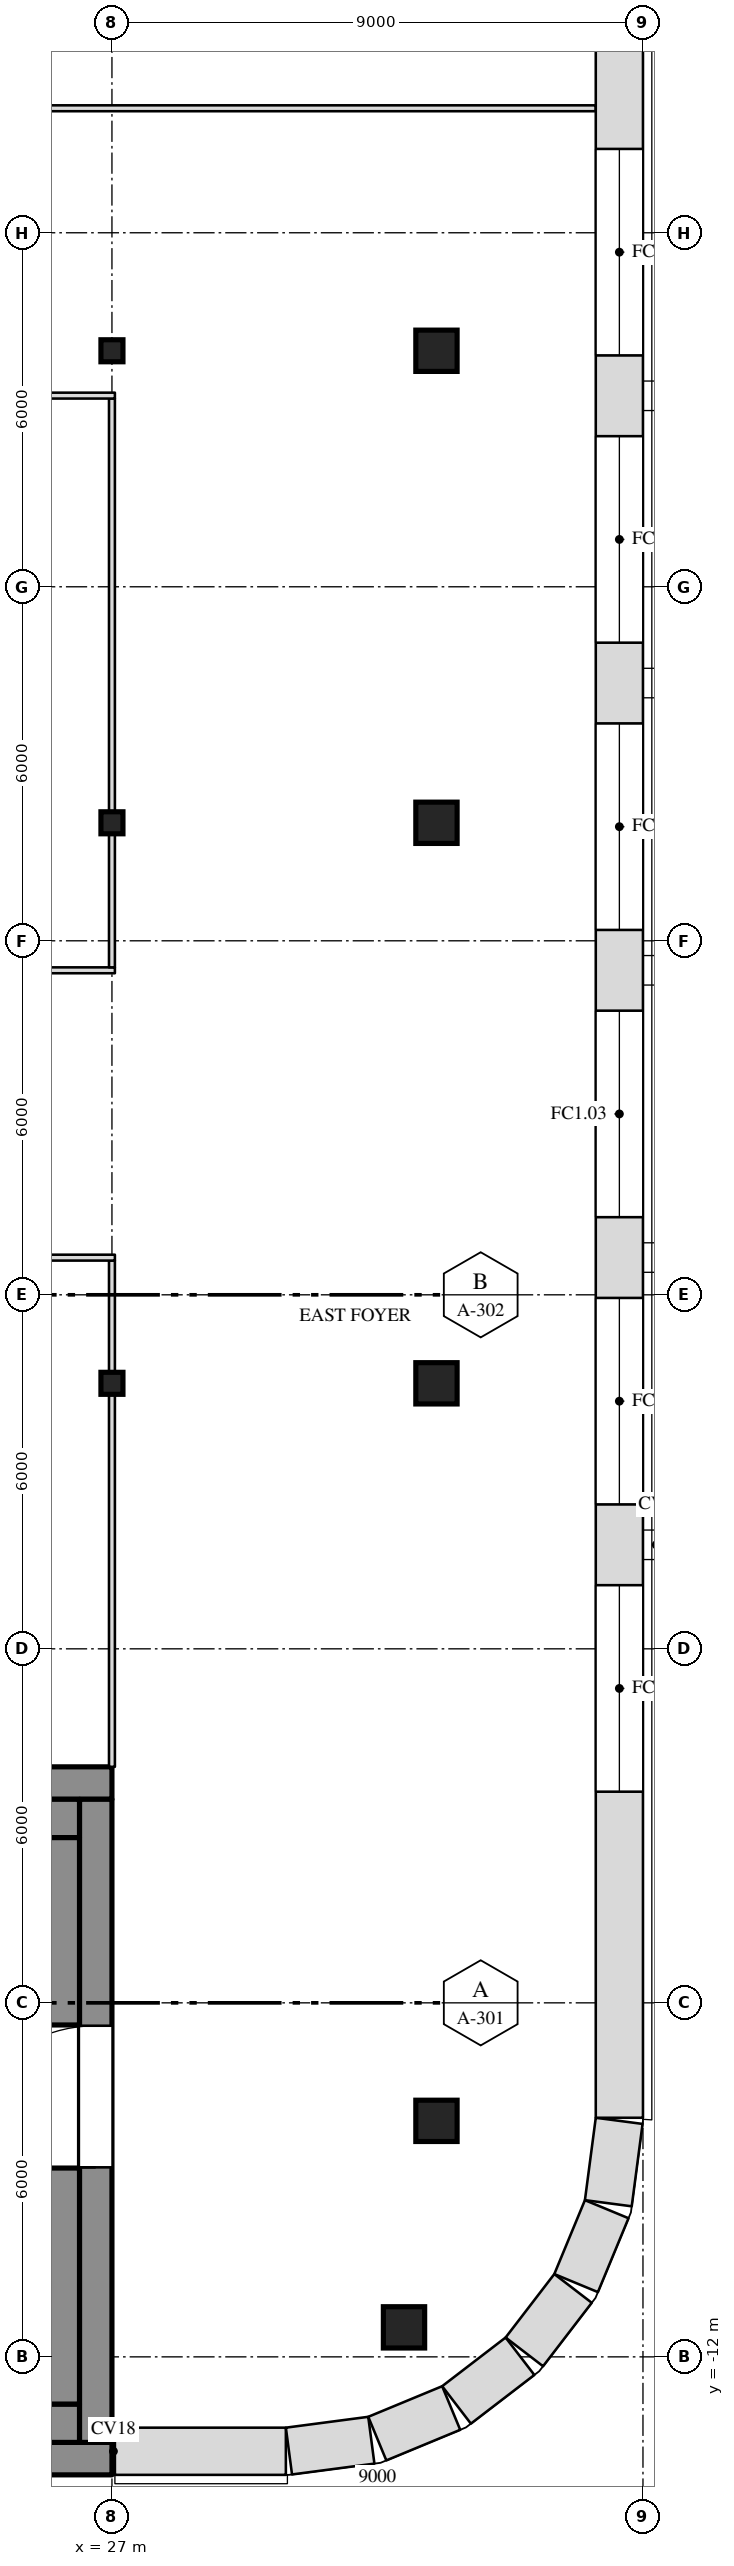
"""IFC4 building model, lengths in metres.
Left out: names, types, materials, properties, quantities, classifications, styles, units other than length and angle.
Written with IfcOpenShell. Run it as: python <this file> out.ifc"""

import sys

from ifc_helpers import new_model, si_unit, direction, frame, frame_2d, origin, origin_2d, place, context, subcontext, project, spatial, rectangle, i_section, extrude, element, fill, save


model = new_model("IFC4")
c1 = context("Model", 3, precision=1e-05, world=origin(), true_north=direction((0.0, 1.0)))
c2 = subcontext(c1, "Body", "Model", "MODEL_VIEW")
j1 = project(units=[si_unit("LENGTHUNIT", "METRE"), si_unit("PLANEANGLEUNIT", "RADIAN")], contexts=[c1])
p1 = place(None, origin())
s1 = spatial("IfcSite", under=j1, at=p1, CompositionType="ELEMENT")
p2 = place(p1, origin())
s2 = spatial("IfcBuilding", under=s1, at=p2, CompositionType="ELEMENT")
p3 = place(p2, frame((0.0, 0.0, 276.5)))
s3 = spatial("IfcBuildingStorey", under=s2, at=p3, CompositionType="ELEMENT", Elevation=276.5)
for number, where, z_axis, x_axis in (
    (1, (31.95, -11.5, 0.0), (0.0, 0.0, 1.0), (1.0, 0.0, 0.0)),
    (2, (32.5, -8.0, 0.0), (0.0, 0.0, 1.0), (1.0, 0.0, 0.0)),
):
    element("IfcColumn", number, at=place(p3, frame(where, z_axis=z_axis, x_axis=x_axis)), inside=s3, PredefinedType="COLUMN", context=c2, shape_type="SweptSolid", body=[
        extrude(rectangle(XDim=0.7, YDim=0.7, at=origin_2d()), origin(), (0.0, 0.0, 1.0), 4.0),
    ])
p4 = place(p3, frame((27.0, 4.5, 0.0), z_axis=(0.0, 0.0, 1.0), x_axis=(1.0, 0.0, 0.0)))
e3 = element("IfcColumn", 3, at=p4, inside=s3, PredefinedType="COLUMN", context=c2, shape_type="SweptSolid", body=[
    extrude(i_section(OverallWidth=0.373, OverallDepth=0.373, WebThickness=0.016, FlangeThickness=0.026, at=origin_2d()), origin(), (0.0, 0.0, 1.0), 4.0),
])
p5 = place(p3, frame((32.5, 4.5, 0.0), z_axis=(0.0, 0.0, 1.0), x_axis=(1.0, 0.0, 0.0)))
e4 = element("IfcColumn", 4, at=p5, inside=s3, PredefinedType="COLUMN", context=c2, shape_type="SweptSolid", body=[
    extrude(rectangle(XDim=0.7, YDim=0.7, at=origin_2d()), origin(), (0.0, 0.0, 1.0), 4.0),
])
p6 = place(p3, frame((27.0, 14.0, 0.0), z_axis=(0.0, 0.0, 1.0), x_axis=(1.0, 0.0, 0.0)))
e5 = element("IfcColumn", 5, at=p6, inside=s3, PredefinedType="COLUMN", context=c2, shape_type="SweptSolid", body=[
    extrude(i_section(OverallWidth=0.373, OverallDepth=0.373, WebThickness=0.016, FlangeThickness=0.026, at=origin_2d()), origin(), (0.0, 0.0, 1.0), 4.0),
])
p7 = place(p3, frame((32.5, 14.0, 0.0), z_axis=(0.0, 0.0, 1.0), x_axis=(1.0, 0.0, 0.0)))
e6 = element("IfcColumn", 6, at=p7, inside=s3, PredefinedType="COLUMN", context=c2, shape_type="SweptSolid", body=[
    extrude(rectangle(XDim=0.7, YDim=0.7, at=origin_2d()), origin(), (0.0, 0.0, 1.0), 4.0),
])
p8 = place(p3, frame((27.0, 22.0, 0.0), z_axis=(0.0, 0.0, 1.0), x_axis=(1.0, 0.0, 0.0)))
e7 = element("IfcColumn", 7, at=p8, inside=s3, PredefinedType="COLUMN", context=c2, shape_type="SweptSolid", body=[
    extrude(i_section(OverallWidth=0.373, OverallDepth=0.373, WebThickness=0.016, FlangeThickness=0.026, at=origin_2d()), origin(), (0.0, 0.0, 1.0), 4.0),
])
p9 = place(p3, frame((32.5, 22.0, 0.0), z_axis=(0.0, 0.0, 1.0), x_axis=(1.0, 0.0, 0.0)))
e8 = element("IfcColumn", 8, at=p9, inside=s3, PredefinedType="COLUMN", context=c2, shape_type="SweptSolid", body=[
    extrude(rectangle(XDim=0.7, YDim=0.7, at=origin_2d()), origin(), (0.0, 0.0, 1.0), 4.0),
])
p10 = place(p3, frame((-27.0, -2.275, 0.0), z_axis=(0.0, 0.0, 1.0), x_axis=(1.0, 0.0, 0.0)))
e9 = element("IfcWall", 9, at=p10, inside=s3, PredefinedType="SHEAR", context=c2, shape_type="SweptSolid", body=[
    extrude(rectangle(XDim=54.0, YDim=0.55, at=frame_2d((27.0, 0.0))), origin(), (0.0, 0.0, 1.0), 3.78),
])
p11 = place(p10, frame((15.15, 0.0, 0.0)))
e10 = element("IfcOpeningElement", 10, at=p11, cuts=e9, PredefinedType="OPENING", context=c2, shape_type="SweptSolid", body=[
    extrude(rectangle(XDim=2.4, YDim=2.1, at=frame_2d((1.2, 1.05))), frame((0.0, 0.287, 0.0), z_axis=(0.0, -1.0, 0.0), x_axis=(1.0, 0.0, 0.0)), (0.0, 0.0, 1.0), 0.574),
])
p12 = place(p10, frame((36.45, 0.0, 0.0)))
e11 = element("IfcOpeningElement", 11, at=p12, cuts=e9, PredefinedType="OPENING", context=c2, shape_type="SweptSolid", body=[
    extrude(rectangle(XDim=2.4, YDim=2.1, at=frame_2d((1.2, 1.05))), frame((0.0, 0.287, 0.0), z_axis=(0.0, -1.0, 0.0), x_axis=(1.0, 0.0, 0.0)), (0.0, 0.0, 1.0), 0.574),
])
p13 = place(p3, frame((-27.0, -13.725, 0.0), z_axis=(0.0, 0.0, 1.0), x_axis=(1.0, 0.0, 0.0)))
e12 = element("IfcWall", 12, at=p13, inside=s3, PredefinedType="SHEAR", context=c2, shape_type="SweptSolid", body=[
    extrude(rectangle(XDim=54.0, YDim=0.55, at=frame_2d((27.0, 0.0))), origin(), (0.0, 0.0, 1.0), 3.78),
])
p14 = place(p3, frame((26.725, -13.45, 0.0), z_axis=(0.0, 0.0, 1.0), x_axis=(0.0, 1.0, 0.0)))
e13 = element("IfcWall", 13, at=p14, inside=s3, PredefinedType="SHEAR", context=c2, shape_type="SweptSolid", body=[
    extrude(rectangle(XDim=10.9, YDim=0.55, at=frame_2d((5.45, 0.0))), origin(), (0.0, 0.0, 1.0), 3.78),
])
p15 = place(p14, frame((4.662, 0.0, 0.0)))
e14 = element("IfcOpeningElement", 14, at=p15, cuts=e13, PredefinedType="OPENING", context=c2, shape_type="SweptSolid", body=[
    extrude(rectangle(XDim=2.4, YDim=2.1, at=frame_2d((1.2, 1.05))), frame((0.0, 0.287, 0.0), z_axis=(0.0, -1.0, 0.0), x_axis=(1.0, 0.0, 0.0)), (0.0, 0.0, 1.0), 0.574),
])
p16 = place(p3, frame((12.0, -2.875, 0.0), z_axis=(0.0, 0.0, 1.0), x_axis=(1.0, 0.0, 0.0)))
e15 = element("IfcWall", 15, at=p16, inside=s3, PredefinedType="SHEAR", context=c2, shape_type="SweptSolid", body=[
    extrude(rectangle(XDim=14.45, YDim=0.65, at=frame_2d((7.225, 0.0))), origin(), (0.0, 0.0, 1.0), 3.78),
])
p17 = place(p3, frame((-26.45, -13.125, 0.0), z_axis=(0.0, 0.0, 1.0), x_axis=(1.0, 0.0, 0.0)))
e16 = element("IfcWall", 16, at=p17, inside=s3, PredefinedType="SHEAR", context=c2, shape_type="SweptSolid", body=[
    extrude(rectangle(XDim=52.9, YDim=0.65, at=frame_2d((26.45, 0.0))), origin(), (0.0, 0.0, 1.0), 3.78),
])
p18 = place(p3, frame((26.125, -12.8, 0.0), z_axis=(0.0, 0.0, 1.0), x_axis=(0.0, 1.0, 0.0)))
e17 = element("IfcWall", 17, at=p18, inside=s3, PredefinedType="SHEAR", context=c2, shape_type="SweptSolid", body=[
    extrude(rectangle(XDim=4.0, YDim=0.65, at=frame_2d((2.0, 0.0))), origin(), (0.0, 0.0, 1.0), 3.78),
])
p19 = place(p3, frame((26.125, -6.375, 0.0), z_axis=(0.0, 0.0, 1.0), x_axis=(0.0, 1.0, 0.0)))
e18 = element("IfcWall", 18, at=p19, inside=s3, PredefinedType="SHEAR", context=c2, shape_type="SweptSolid", body=[
    extrude(rectangle(XDim=3.175, YDim=0.65, at=frame_2d((1.587, 0.0))), origin(), (0.0, 0.0, 1.0), 3.78),
])
p20 = place(p3, frame((27.0, -2.0, 0.0), z_axis=(0.0, 0.0, 1.0), x_axis=(0.0, 1.0, 0.0)))
e19 = element("IfcWall", 19, at=p20, inside=s3, PredefinedType="PARTITIONING", context=c2, shape_type="SweptSolid", body=[
    extrude(rectangle(XDim=6.313, YDim=0.1, at=frame_2d((3.157, 0.0))), origin(), (0.0, 0.0, 1.0), 3.247),
])
p21 = place(p3, frame((27.0, 4.687, 0.0), z_axis=(0.0, 0.0, 1.0), x_axis=(0.0, 1.0, 0.0)))
e20 = element("IfcWall", 20, at=p21, inside=s3, PredefinedType="PARTITIONING", context=c2, shape_type="SweptSolid", body=[
    extrude(rectangle(XDim=1.893, YDim=0.1, at=frame_2d((0.947, 0.0))), origin(), (0.0, 0.0, 1.0), 3.247),
])
p22 = place(p3, frame((13.45, 6.63, 0.0), z_axis=(0.0, 0.0, 1.0), x_axis=(1.0, 0.0, 0.0)))
e21 = element("IfcWall", 21, at=p22, inside=s3, PredefinedType="PARTITIONING", context=c2, shape_type="SweptSolid", body=[
    extrude(rectangle(XDim=13.6, YDim=0.1, at=frame_2d((6.8, 0.0))), origin(), (0.0, 0.0, 1.0), 3.78),
])
p23 = place(p3, frame((-27.05, 11.5, 0.0), z_axis=(0.0, 0.0, 1.0), x_axis=(1.0, 0.0, 0.0)))
e22 = element("IfcWall", 22, at=p23, inside=s3, PredefinedType="PARTITIONING", context=c2, shape_type="SweptSolid", body=[
    extrude(rectangle(XDim=54.1, YDim=0.1, at=frame_2d((27.05, 0.0))), origin(), (0.0, 0.0, 1.0), 3.78),
])
p24 = place(p23, frame((6.35, 0.0, 0.0)))
e23 = element("IfcOpeningElement", 23, at=p24, cuts=e22, PredefinedType="OPENING", context=c2, shape_type="SweptSolid", body=[
    extrude(rectangle(XDim=0.9, YDim=2.1, at=frame_2d((0.45, 1.05))), frame((0.0, 0.062, 0.0), z_axis=(0.0, -1.0, 0.0), x_axis=(1.0, 0.0, 0.0)), (0.0, 0.0, 1.0), 0.124),
])
p25 = place(p23, frame((21.65, 0.0, 0.0)))
e24 = element("IfcOpeningElement", 24, at=p25, cuts=e22, PredefinedType="OPENING", context=c2, shape_type="SweptSolid", body=[
    extrude(rectangle(XDim=1.8, YDim=2.1, at=frame_2d((0.9, 1.05))), frame((0.0, 0.062, 0.0), z_axis=(0.0, -1.0, 0.0), x_axis=(1.0, 0.0, 0.0)), (0.0, 0.0, 1.0), 0.124),
])
p26 = place(p23, frame((35.6, 0.0, 0.0)))
e25 = element("IfcOpeningElement", 25, at=p26, cuts=e22, PredefinedType="OPENING", context=c2, shape_type="SweptSolid", body=[
    extrude(rectangle(XDim=0.9, YDim=2.1, at=frame_2d((0.45, 1.05))), frame((0.0, 0.062, 0.0), z_axis=(0.0, -1.0, 0.0), x_axis=(1.0, 0.0, 0.0)), (0.0, 0.0, 1.0), 0.124),
])
p27 = place(p23, frame((46.4, 0.0, 0.0)))
e26 = element("IfcOpeningElement", 26, at=p27, cuts=e22, PredefinedType="OPENING", context=c2, shape_type="SweptSolid", body=[
    extrude(rectangle(XDim=1.8, YDim=2.1, at=frame_2d((0.9, 1.05))), frame((0.0, 0.062, 0.0), z_axis=(0.0, -1.0, 0.0), x_axis=(1.0, 0.0, 0.0)), (0.0, 0.0, 1.0), 0.124),
])
p28 = place(p3, frame((27.0, 11.55, 0.0), z_axis=(0.0, 0.0, 1.0), x_axis=(0.0, 1.0, 0.0)))
e27 = element("IfcWall", 27, at=p28, inside=s3, PredefinedType="PARTITIONING", context=c2, shape_type="SweptSolid", body=[
    extrude(rectangle(XDim=2.263, YDim=0.1, at=frame_2d((1.132, 0.0))), origin(), (0.0, 0.0, 1.0), 3.247),
])
p29 = place(p3, frame((27.0, 14.187, 0.0), z_axis=(0.0, 0.0, 1.0), x_axis=(0.0, 1.0, 0.0)))
e28 = element("IfcWall", 28, at=p29, inside=s3, PredefinedType="PARTITIONING", context=c2, shape_type="SweptSolid", body=[
    extrude(rectangle(XDim=7.003, YDim=0.1, at=frame_2d((3.501, 0.0))), origin(), (0.0, 0.0, 1.0), 3.247),
])
p30 = place(p3, frame((-27.05, 21.24, 0.0), z_axis=(0.0, 0.0, 1.0), x_axis=(1.0, 0.0, 0.0)))
e29 = element("IfcWall", 29, at=p30, inside=s3, PredefinedType="PARTITIONING", context=c2, shape_type="SweptSolid", body=[
    extrude(rectangle(XDim=54.1, YDim=0.1, at=frame_2d((27.05, 0.0))), origin(), (0.0, 0.0, 1.0), 3.78),
])
p31 = place(p3, frame((-35.2, 26.11, 0.0), z_axis=(0.0, 0.0, 1.0), x_axis=(1.0, 0.0, 0.0)))
e30 = element("IfcWall", 30, at=p31, inside=s3, PredefinedType="PARTITIONING", context=c2, shape_type="SweptSolid", body=[
    extrude(rectangle(XDim=70.4, YDim=0.1, at=frame_2d((35.2, 0.0))), origin(), (0.0, 0.0, 1.0), 3.78),
])
p32 = place(p31, frame((12.25, 0.0, 0.0)))
e31 = element("IfcOpeningElement", 31, at=p32, cuts=e30, PredefinedType="OPENING", context=c2, shape_type="SweptSolid", body=[
    extrude(rectangle(XDim=0.9, YDim=2.1, at=frame_2d((0.45, 1.05))), frame((0.0, 0.062, 0.0), z_axis=(0.0, -1.0, 0.0), x_axis=(1.0, 0.0, 0.0)), (0.0, 0.0, 1.0), 0.124),
])
p33 = place(p31, frame((21.25, 0.0, 0.0)))
e32 = element("IfcOpeningElement", 32, at=p33, cuts=e30, PredefinedType="OPENING", context=c2, shape_type="SweptSolid", body=[
    extrude(rectangle(XDim=0.9, YDim=2.1, at=frame_2d((0.45, 1.05))), frame((0.0, 0.062, 0.0), z_axis=(0.0, -1.0, 0.0), x_axis=(1.0, 0.0, 0.0)), (0.0, 0.0, 1.0), 0.124),
])
p34 = place(p31, frame((36.55, 0.0, 0.0)))
e33 = element("IfcOpeningElement", 33, at=p34, cuts=e30, PredefinedType="OPENING", context=c2, shape_type="SweptSolid", body=[
    extrude(rectangle(XDim=1.8, YDim=2.1, at=frame_2d((0.9, 1.05))), frame((0.0, 0.062, 0.0), z_axis=(0.0, -1.0, 0.0), x_axis=(1.0, 0.0, 0.0)), (0.0, 0.0, 1.0), 0.124),
])
p35 = place(p31, frame((52.75, 0.0, 0.0)))
e34 = element("IfcOpeningElement", 34, at=p35, cuts=e30, PredefinedType="OPENING", context=c2, shape_type="SweptSolid", body=[
    extrude(rectangle(XDim=0.9, YDim=2.1, at=frame_2d((0.45, 1.05))), frame((0.0, 0.062, 0.0), z_axis=(0.0, -1.0, 0.0), x_axis=(1.0, 0.0, 0.0)), (0.0, 0.0, 1.0), 0.124),
])
p36 = place(p31, frame((59.5, 0.0, 0.0)))
e35 = element("IfcOpeningElement", 35, at=p36, cuts=e30, PredefinedType="OPENING", context=c2, shape_type="SweptSolid", body=[
    extrude(rectangle(XDim=0.9, YDim=2.1, at=frame_2d((0.45, 1.05))), frame((0.0, 0.062, 0.0), z_axis=(0.0, -1.0, 0.0), x_axis=(1.0, 0.0, 0.0)), (0.0, 0.0, 1.0), 0.124),
])
p37 = place(p3, frame((27.05, -13.6, 0.0), z_axis=(0.0, 0.0, 1.0), x_axis=(1.0, 0.0, 0.0)))
e36 = element("IfcWall", 36, at=p37, inside=s3, PredefinedType="SOLIDWALL", context=c2, shape_type="SweptSolid", body=[
    extrude(rectangle(XDim=2.897, YDim=0.8, at=frame_2d((1.449, 0.0))), origin(), (0.0, 0.0, 1.0), 3.78),
])
p38 = place(p3, frame((30.0, -13.597, 0.0), z_axis=(0.0, 0.0, 1.0), x_axis=(0.99144603414, 0.130517283865, 0.0)))
e37 = element("IfcWall", 37, at=p38, inside=s3, PredefinedType="SOLIDWALL", context=c2, shape_type="SweptSolid", body=[
    extrude(rectangle(XDim=1.408, YDim=0.8, at=frame_2d((0.704, 0.0))), origin(), (0.0, 0.0, 1.0), 3.78),
])
p39 = place(p3, frame((31.497, -13.386, 0.0), z_axis=(0.0, 0.0, 1.0), x_axis=(0.923847774587, 0.38276009378, 0.0)))
e38 = element("IfcWall", 38, at=p39, inside=s3, PredefinedType="SOLIDWALL", context=c2, shape_type="SweptSolid", body=[
    extrude(rectangle(XDim=1.355, YDim=0.8, at=frame_2d((0.678, 0.0))), origin(), (0.0, 0.0, 1.0), 3.78),
])
for number, where, z_axis, x_axis in (
    (39, (32.84, -12.815, 0.0), (0.0, 0.0, 1.0), (0.793, 0.609, 0.0)),
    (40, (33.989, -11.916, 0.0), (0.0, 0.0, 1.0), (0.609, 0.793, 0.0)),
):
    element("IfcWall", number, at=place(p3, frame(where, z_axis=z_axis, x_axis=x_axis)), inside=s3, PredefinedType="SOLIDWALL", context=c2, shape_type="SweptSolid", body=[
        extrude(rectangle(XDim=1.356, YDim=0.8, at=frame_2d((0.678, 0.0))), origin(), (0.0, 0.0, 1.0), 3.78),
    ])
p40 = place(p3, frame((34.867, -10.75, 0.0), z_axis=(0.0, 0.0, 1.0), x_axis=(0.38276009378, 0.923847774587, 0.0)))
e41 = element("IfcWall", 41, at=p40, inside=s3, PredefinedType="SOLIDWALL", context=c2, shape_type="SweptSolid", body=[
    extrude(rectangle(XDim=1.355, YDim=0.8, at=frame_2d((0.678, 0.0))), origin(), (0.0, 0.0, 1.0), 3.78),
])
p41 = place(p3, frame((35.413, -9.396, 0.0), z_axis=(0.0, 0.0, 1.0), x_axis=(0.130517283865, 0.99144603414, 0.0)))
e42 = element("IfcWall", 42, at=p41, inside=s3, PredefinedType="SOLIDWALL", context=c2, shape_type="SweptSolid", body=[
    extrude(rectangle(XDim=1.408, YDim=0.8, at=frame_2d((0.704, 0.0))), origin(), (0.0, 0.0, 1.0), 3.78),
])
p42 = place(p3, frame((35.6, -7.948, 0.0), z_axis=(0.0, 0.0, 1.0), x_axis=(0.0, 1.0, 0.0)))
e43 = element("IfcWall", 43, at=p42, inside=s3, PredefinedType="SOLIDWALL", context=c2, shape_type="SweptSolid", body=[
    extrude(rectangle(XDim=38.895, YDim=0.8, at=frame_2d((19.448, 0.0))), origin(), (0.0, 0.0, 1.0), 3.78),
])
p43 = place(p42, frame((5.526, 0.0, 1.0)))
e44 = element("IfcOpeningElement", 44, at=p43, cuts=e43, PredefinedType="OPENING", context=c2, shape_type="SweptSolid", body=[
    extrude(rectangle(XDim=3.5, YDim=2.5, at=frame_2d((1.75, 1.25))), frame((0.0, 0.412, 0.0), z_axis=(0.0, -1.0, 0.0), x_axis=(1.0, 0.0, 0.0)), (0.0, 0.0, 1.0), 0.824),
])
p44 = place(p42, frame((10.395, 0.0, 1.0)))
e45 = element("IfcOpeningElement", 45, at=p44, cuts=e43, PredefinedType="OPENING", context=c2, shape_type="SweptSolid", body=[
    extrude(rectangle(XDim=3.5, YDim=2.5, at=frame_2d((1.75, 1.25))), frame((0.0, 0.412, 0.0), z_axis=(0.0, -1.0, 0.0), x_axis=(1.0, 0.0, 0.0)), (0.0, 0.0, 1.0), 0.824),
])
p45 = place(p42, frame((15.263, 0.0, 1.0)))
e46 = element("IfcOpeningElement", 46, at=p45, cuts=e43, PredefinedType="OPENING", context=c2, shape_type="SweptSolid", body=[
    extrude(rectangle(XDim=3.5, YDim=2.5, at=frame_2d((1.75, 1.25))), frame((0.0, 0.412, 0.0), z_axis=(0.0, -1.0, 0.0), x_axis=(1.0, 0.0, 0.0)), (0.0, 0.0, 1.0), 0.824),
])
p46 = place(p42, frame((20.132, 0.0, 1.0)))
e47 = element("IfcOpeningElement", 47, at=p46, cuts=e43, PredefinedType="OPENING", context=c2, shape_type="SweptSolid", body=[
    extrude(rectangle(XDim=3.5, YDim=2.5, at=frame_2d((1.75, 1.25))), frame((0.0, 0.412, 0.0), z_axis=(0.0, -1.0, 0.0), x_axis=(1.0, 0.0, 0.0)), (0.0, 0.0, 1.0), 0.824),
])
p47 = place(p42, frame((25.0, 0.0, 1.0)))
e48 = element("IfcOpeningElement", 48, at=p47, cuts=e43, PredefinedType="OPENING", context=c2, shape_type="SweptSolid", body=[
    extrude(rectangle(XDim=3.5, YDim=2.5, at=frame_2d((1.75, 1.25))), frame((0.0, 0.412, 0.0), z_axis=(0.0, -1.0, 0.0), x_axis=(1.0, 0.0, 0.0)), (0.0, 0.0, 1.0), 0.824),
])
p48 = place(p42, frame((29.869, 0.0, 1.0)))
e49 = element("IfcOpeningElement", 49, at=p48, cuts=e43, PredefinedType="OPENING", context=c2, shape_type="SweptSolid", body=[
    extrude(rectangle(XDim=3.5, YDim=2.5, at=frame_2d((1.75, 1.25))), frame((0.0, 0.412, 0.0), z_axis=(0.0, -1.0, 0.0), x_axis=(1.0, 0.0, 0.0)), (0.0, 0.0, 1.0), 0.824),
])
p49 = place(p43, origin())
e50 = element("IfcWindow", 50, at=p49, inside=s3, PartitioningType="SINGLE_PANEL", PredefinedType="WINDOW", context=c2, shape_type="SweptSolid", body=[
    extrude(rectangle(XDim=3.5, YDim=2.5, at=frame_2d((1.75, 1.25))), frame((0.0, 0.03, 0.0), z_axis=(0.0, -1.0, 0.0), x_axis=(1.0, 0.0, 0.0)), (0.0, 0.0, 1.0), 0.06),
])
fill(e44, e50)
p50 = place(p44, origin())
e51 = element("IfcWindow", 51, at=p50, inside=s3, PartitioningType="SINGLE_PANEL", PredefinedType="WINDOW", context=c2, shape_type="SweptSolid", body=[
    extrude(rectangle(XDim=3.5, YDim=2.5, at=frame_2d((1.75, 1.25))), frame((0.0, 0.03, 0.0), z_axis=(0.0, -1.0, 0.0), x_axis=(1.0, 0.0, 0.0)), (0.0, 0.0, 1.0), 0.06),
])
fill(e45, e51)
p51 = place(p45, origin())
e52 = element("IfcWindow", 52, at=p51, inside=s3, PartitioningType="SINGLE_PANEL", PredefinedType="WINDOW", context=c2, shape_type="SweptSolid", body=[
    extrude(rectangle(XDim=3.5, YDim=2.5, at=frame_2d((1.75, 1.25))), frame((0.0, 0.03, 0.0), z_axis=(0.0, -1.0, 0.0), x_axis=(1.0, 0.0, 0.0)), (0.0, 0.0, 1.0), 0.06),
])
fill(e46, e52)
p52 = place(p46, origin())
e53 = element("IfcWindow", 53, at=p52, inside=s3, PartitioningType="SINGLE_PANEL", PredefinedType="WINDOW", context=c2, shape_type="SweptSolid", body=[
    extrude(rectangle(XDim=3.5, YDim=2.5, at=frame_2d((1.75, 1.25))), frame((0.0, 0.03, 0.0), z_axis=(0.0, -1.0, 0.0), x_axis=(1.0, 0.0, 0.0)), (0.0, 0.0, 1.0), 0.06),
])
fill(e47, e53)
p53 = place(p47, origin())
e54 = element("IfcWindow", 54, at=p53, inside=s3, PartitioningType="SINGLE_PANEL", PredefinedType="WINDOW", context=c2, shape_type="SweptSolid", body=[
    extrude(rectangle(XDim=3.5, YDim=2.5, at=frame_2d((1.75, 1.25))), frame((0.0, 0.03, 0.0), z_axis=(0.0, -1.0, 0.0), x_axis=(1.0, 0.0, 0.0)), (0.0, 0.0, 1.0), 0.06),
])
fill(e48, e54)
p54 = place(p48, origin())
e55 = element("IfcWindow", 55, at=p54, inside=s3, PartitioningType="SINGLE_PANEL", PredefinedType="WINDOW", context=c2, shape_type="SweptSolid", body=[
    extrude(rectangle(XDim=3.5, YDim=2.5, at=frame_2d((1.75, 1.25))), frame((0.0, 0.03, 0.0), z_axis=(0.0, -1.0, 0.0), x_axis=(1.0, 0.0, 0.0)), (0.0, 0.0, 1.0), 0.06),
])
fill(e49, e55)
p55 = place(p15, origin())
e56 = element("IfcDoor", 56, at=p55, inside=s3, OperationType="DOUBLE_DOOR_SINGLE_SWING", PredefinedType="DOOR", context=c2, shape_type="SweptSolid", body=[
    extrude(rectangle(XDim=2.4, YDim=2.1, at=frame_2d((1.2, 1.05))), frame((0.0, 0.025, 0.0), z_axis=(0.0, -1.0, 0.0), x_axis=(1.0, 0.0, 0.0)), (0.0, 0.0, 1.0), 0.05),
])
fill(e14, e56)
save(model, sys.argv[1])
